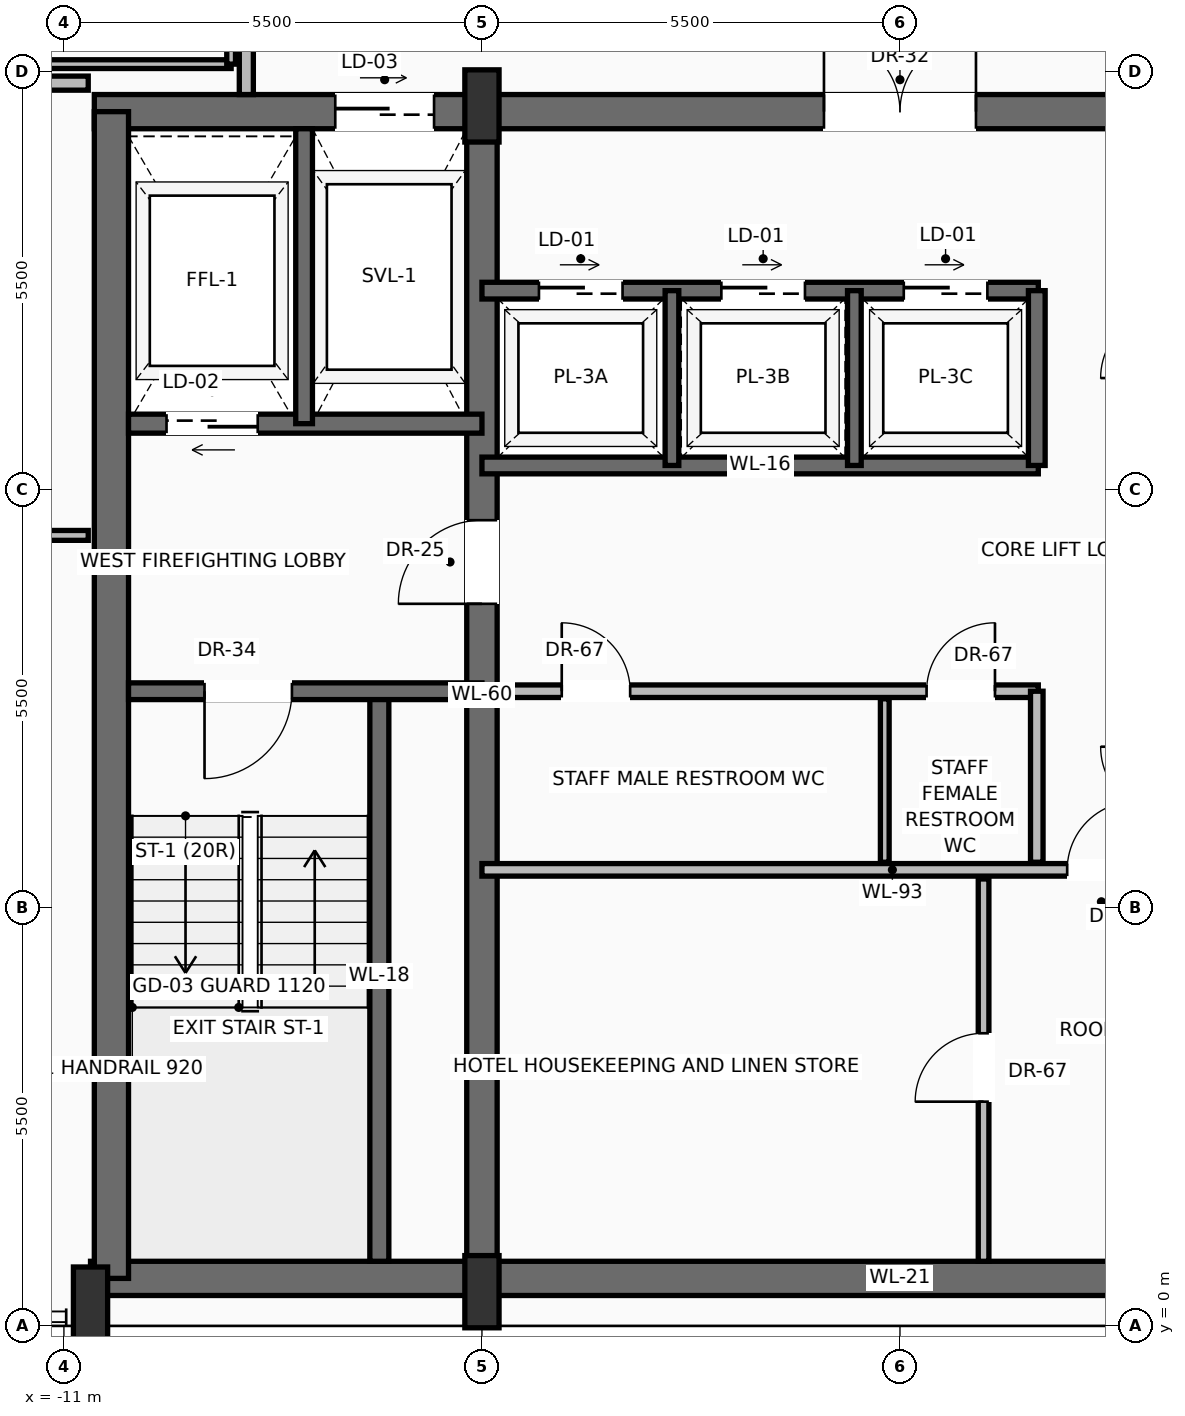
"""IFC4 building model, lengths in metres.
Left out: names, types, materials, properties, quantities, classifications, styles, units other than length and angle.
Written with IfcOpenShell. Run it as: python <this file> out.ifc"""

import sys

from ifc_helpers import new_model, si_unit, direction, frame, frame_2d, origin, origin_2d, place, context, subcontext, project, spatial, rectangle, extrude, source, transform, mapped, element, fill, save


model = new_model("IFC4")
c1 = context("Model", 3, precision=1e-05, world=origin(), true_north=direction((0.0, 1.0)))
c2 = subcontext(c1, "Body", "Model", "MODEL_VIEW")
j1 = project(units=[si_unit("LENGTHUNIT", "METRE"), si_unit("PLANEANGLEUNIT", "RADIAN")], contexts=[c1])
p1 = place(None, origin())
s1 = spatial("IfcSite", under=j1, at=p1, CompositionType="ELEMENT")
p2 = place(p1, origin())
s2 = spatial("IfcBuilding", under=s1, at=p2, CompositionType="ELEMENT")
p3 = place(p2, frame((0.0, 0.0, 266.1)))
s3 = spatial("IfcBuildingStorey", under=s2, at=p3, CompositionType="ELEMENT", Elevation=266.1)
p4 = place(p3, frame((-10.65, 0.625, 0.0), z_axis=(0.0, 0.0, 1.0), x_axis=(1.0, 0.0, 0.0)))
e1 = element("IfcWall", 1, at=p4, inside=s3, PredefinedType="SHEAR", context=c2, shape_type="SweptSolid", body=[
    extrude(rectangle(XDim=21.3, YDim=0.45, at=frame_2d((10.65, 0.0))), origin(), (0.0, 0.0, 1.0), 3.24),
])
p5 = place(p3, frame((-10.6, 15.975, 0.0), z_axis=(0.0, 0.0, 1.0), x_axis=(1.0, 0.0, 0.0)))
e2 = element("IfcWall", 2, at=p5, inside=s3, PredefinedType="SHEAR", context=c2, shape_type="SweptSolid", body=[
    extrude(rectangle(XDim=21.2, YDim=0.45, at=frame_2d((10.6, 0.0))), origin(), (0.0, 0.0, 1.0), 3.24),
])
p6 = place(p5, frame((3.17, 0.0, 0.0)))
e3 = element("IfcOpeningElement", 3, at=p6, cuts=e2, PredefinedType="OPENING", context=c2, shape_type="SweptSolid", body=[
    extrude(rectangle(XDim=1.3, YDim=2.3, at=frame_2d((0.65, 1.15))), frame((0.0, 0.235, 0.0), z_axis=(0.0, -1.0, 0.0), x_axis=(1.0, 0.0, 0.0)), (0.0, 0.0, 1.0), 0.47),
])
p7 = place(p5, frame((9.6, 0.0, 0.0)))
e4 = element("IfcOpeningElement", 4, at=p7, cuts=e2, PredefinedType="OPENING", context=c2, shape_type="SweptSolid", body=[
    extrude(rectangle(XDim=2.0, YDim=2.4, at=frame_2d((1.0, 1.2))), frame((0.0, 0.235, 0.0), z_axis=(0.0, -1.0, 0.0), x_axis=(1.0, 0.0, 0.0)), (0.0, 0.0, 1.0), 0.47),
])
p8 = place(p3, frame((-10.375, 0.625, 0.0), z_axis=(0.0, 0.0, 1.0), x_axis=(0.0, 1.0, 0.0)))
e5 = element("IfcWall", 5, at=p8, inside=s3, PredefinedType="SHEAR", context=c2, shape_type="SweptSolid", body=[
    extrude(rectangle(XDim=15.35, YDim=0.45, at=frame_2d((7.675, 0.0))), origin(), (0.0, 0.0, 1.0), 3.24),
])
p9 = place(p3, frame((-5.5, 0.625, 0.0), z_axis=(0.0, 0.0, 1.0), x_axis=(0.0, 1.0, 0.0)))
e6 = element("IfcWall", 6, at=p9, inside=s3, PredefinedType="SHEAR", context=c2, shape_type="SweptSolid", body=[
    extrude(rectangle(XDim=15.35, YDim=0.4, at=frame_2d((7.675, 0.0))), origin(), (0.0, 0.0, 1.0), 3.24),
])
p10 = place(p9, frame((8.875, 0.0, 0.0)))
e7 = element("IfcOpeningElement", 7, at=p10, cuts=e6, PredefinedType="OPENING", context=c2, shape_type="SweptSolid", body=[
    extrude(rectangle(XDim=1.1, YDim=2.2, at=frame_2d((0.55, 1.1))), frame((0.0, 0.21, 0.0), z_axis=(0.0, -1.0, 0.0), x_axis=(1.0, 0.0, 0.0)), (0.0, 0.0, 1.0), 0.42),
])
m1 = source(origin(), c2, "Body", "SweptSolid", [
    extrude(rectangle(XDim=0.45, YDim=0.95, at=origin_2d()), origin(), (0.0, 0.0, 1.0), 3.45),
])
for number, where, z_axis, x_axis in (
    (8, (-10.65, 0.3, 0.0), (0.0, 0.0, 1.0), (1.0, 0.0, 0.0)),
    (9, (-5.5, 0.45, 0.0), (0.0, 0.0, 1.0), (1.0, 0.0, 0.0)),
    (10, (-5.5, 16.05, 0.0), (0.0, 0.0, 1.0), (1.0, 0.0, 0.0)),
):
    element("IfcColumn", number, at=place(p3, frame(where, z_axis=z_axis, x_axis=x_axis)), inside=s3, PredefinedType="PILASTER", context=c2, shape_type="MappedRepresentation", body=[
        mapped(m1, transform((0.0, 0.0, 0.0), scale=1.0)),
    ])
p11 = place(p3, frame((-18.713, 14.466, 0.0), z_axis=(0.0, 0.0, 1.0), x_axis=(0.501837095331, 0.864962155097, 0.0)))
e11 = element("IfcWall", 11, at=p11, inside=s3, PredefinedType="SOLIDWALL", context=c2, shape_type="SweptSolid", body=[
    extrude(rectangle(XDim=19.956, YDim=0.28, at=frame_2d((9.978, 0.0))), origin(), (0.0, 0.0, 1.0), 2.82),
])
p12 = place(p11, frame((4.789, 0.0, 0.0)))
e12 = element("IfcOpeningElement", 12, at=p12, cuts=e11, PredefinedType="OPENING", context=c2, shape_type="SweptSolid", body=[
    extrude(rectangle(XDim=1.6, YDim=2.35, at=frame_2d((0.8, 1.175))), frame((0.0, 0.15, 0.0), z_axis=(0.0, -1.0, 0.0), x_axis=(1.0, 0.0, 0.0)), (0.0, 0.0, 1.0), 0.3),
])
p13 = place(p11, frame((13.57, 0.0, 0.9)))
e13 = element("IfcOpeningElement", 13, at=p13, cuts=e11, PredefinedType="OPENING", context=c2, shape_type="SweptSolid", body=[
    extrude(rectangle(XDim=1.55, YDim=1.75, at=frame_2d((0.775, 0.875))), frame((0.0, 0.15, 0.0), z_axis=(0.0, -1.0, 0.0), x_axis=(1.0, 0.0, 0.0)), (0.0, 0.0, 1.0), 0.3),
])
p14 = place(p3, frame((-6.85, 0.85, 0.0), z_axis=(0.0, 0.0, 1.0), x_axis=(0.0, 1.0, 0.0)))
e14 = element("IfcWall", 14, at=p14, inside=s3, PredefinedType="SOLIDWALL", context=c2, shape_type="SweptSolid", body=[
    extrude(rectangle(XDim=7.5, YDim=0.25, at=frame_2d((3.75, 0.0))), origin(), (0.0, 0.0, 1.0), 3.24),
])
p15 = place(p3, frame((-5.5, 8.35, 0.0), z_axis=(0.0, 0.0, 1.0), x_axis=(-1.0, 0.0, 0.0)))
e15 = element("IfcWall", 15, at=p15, inside=s3, PredefinedType="SOLIDWALL", context=c2, shape_type="SweptSolid", body=[
    extrude(rectangle(XDim=4.65, YDim=0.22, at=frame_2d((2.325, 0.0))), origin(), (0.0, 0.0, 1.0), 3.24),
])
p16 = place(p15, frame((2.5, 0.0, 0.0)))
e16 = element("IfcOpeningElement", 16, at=p16, cuts=e15, PredefinedType="OPENING", context=c2, shape_type="SweptSolid", body=[
    extrude(rectangle(XDim=1.15, YDim=2.2, at=frame_2d((0.575, 1.1))), frame((0.0, 0.12, 0.0), z_axis=(0.0, -1.0, 0.0), x_axis=(1.0, 0.0, 0.0)), (0.0, 0.0, 1.0), 0.24),
])
p17 = place(p3, frame((-5.5, 11.87, 0.0), z_axis=(0.0, 0.0, 1.0), x_axis=(-1.0, 0.0, 0.0)))
e17 = element("IfcWall", 17, at=p17, inside=s3, PredefinedType="SOLIDWALL", context=c2, shape_type="SweptSolid", body=[
    extrude(rectangle(XDim=4.65, YDim=0.25, at=frame_2d((2.325, 0.0))), origin(), (0.0, 0.0, 1.0), 3.24),
])
p18 = place(p17, frame((2.95, 0.0, 0.0)))
e18 = element("IfcOpeningElement", 18, at=p18, cuts=e17, PredefinedType="OPENING", context=c2, shape_type="SweptSolid", body=[
    extrude(rectangle(XDim=1.2, YDim=2.25, at=frame_2d((0.6, 1.125))), frame((0.0, 0.135, 0.0), z_axis=(0.0, -1.0, 0.0), x_axis=(1.0, 0.0, 0.0)), (0.0, 0.0, 1.0), 0.27),
])
p19 = place(p3, frame((-7.84, 11.87, 0.0), z_axis=(0.0, 0.0, 1.0), x_axis=(0.0, 1.0, 0.0)))
e19 = element("IfcWall", 19, at=p19, inside=s3, PredefinedType="SOLIDWALL", context=c2, shape_type="SweptSolid", body=[
    extrude(rectangle(XDim=3.88, YDim=0.22, at=frame_2d((1.94, 0.0))), origin(), (0.0, 0.0, 1.0), 3.24),
])
p20 = place(p3, frame((-5.5, 6.0, 0.0), z_axis=(0.0, 0.0, 1.0), x_axis=(1.0, 0.0, 0.0)))
e20 = element("IfcWall", 20, at=p20, inside=s3, PredefinedType="PARTITIONING", context=c2, shape_type="SweptSolid", body=[
    extrude(rectangle(XDim=10.8, YDim=0.165, at=frame_2d((5.4, 0.0))), origin(), (0.0, 0.0, 1.0), 3.232),
])
p21 = place(p20, frame((7.7, 0.0, 0.0)))
e21 = element("IfcOpeningElement", 21, at=p21, cuts=e20, PredefinedType="OPENING", context=c2, shape_type="SweptSolid", body=[
    extrude(rectangle(XDim=0.9, YDim=2.1, at=frame_2d((0.45, 1.05))), frame((0.0, 0.093, 0.0), z_axis=(0.0, -1.0, 0.0), x_axis=(1.0, 0.0, 0.0)), (0.0, 0.0, 1.0), 0.185),
])
p22 = place(p3, frame((1.1, 0.85, 0.0), z_axis=(0.0, 0.0, 1.0), x_axis=(0.0, 1.0, 0.0)))
e22 = element("IfcWall", 22, at=p22, inside=s3, PredefinedType="PARTITIONING", context=c2, shape_type="SweptSolid", body=[
    extrude(rectangle(XDim=5.03, YDim=0.14, at=frame_2d((2.515, 0.0))), origin(), (0.0, 0.0, 1.0), 3.232),
])
p23 = place(p22, frame((2.1, 0.0, 0.0)))
e23 = element("IfcOpeningElement", 23, at=p23, cuts=e22, PredefinedType="OPENING", context=c2, shape_type="SweptSolid", body=[
    extrude(rectangle(XDim=0.9, YDim=2.1, at=frame_2d((0.45, 1.05))), frame((0.0, 0.08, 0.0), z_axis=(0.0, -1.0, 0.0), x_axis=(1.0, 0.0, 0.0)), (0.0, 0.0, 1.0), 0.16),
])
p24 = place(p3, frame((-5.3, 8.35, 0.0), z_axis=(0.0, 0.0, 1.0), x_axis=(1.0, 0.0, 0.0)))
e24 = element("IfcWall", 24, at=p24, inside=s3, PredefinedType="PARTITIONING", context=c2, shape_type="SweptSolid", body=[
    extrude(rectangle(XDim=7.12, YDim=0.165, at=frame_2d((3.56, 0.0))), origin(), (0.0, 0.0, 1.0), 3.232),
])
p25 = place(p24, frame((0.85, 0.0, 0.0)))
e25 = element("IfcOpeningElement", 25, at=p25, cuts=e24, PredefinedType="OPENING", context=c2, shape_type="SweptSolid", body=[
    extrude(rectangle(XDim=0.9, YDim=2.1, at=frame_2d((0.45, 1.05))), frame((0.0, 0.093, 0.0), z_axis=(0.0, -1.0, 0.0), x_axis=(1.0, 0.0, 0.0)), (0.0, 0.0, 1.0), 0.185),
])
p26 = place(p24, frame((5.65, 0.0, 0.0)))
e26 = element("IfcOpeningElement", 26, at=p26, cuts=e24, PredefinedType="OPENING", context=c2, shape_type="SweptSolid", body=[
    extrude(rectangle(XDim=0.9, YDim=2.1, at=frame_2d((0.45, 1.05))), frame((0.0, 0.093, 0.0), z_axis=(0.0, -1.0, 0.0), x_axis=(1.0, 0.0, 0.0)), (0.0, 0.0, 1.0), 0.185),
])
p27 = place(p3, frame((1.8, 6.1, 0.0), z_axis=(0.0, 0.0, 1.0), x_axis=(0.0, 1.0, 0.0)))
e27 = element("IfcWall", 27, at=p27, inside=s3, PredefinedType="PARTITIONING", context=c2, shape_type="SweptSolid", body=[
    extrude(rectangle(XDim=2.25, YDim=0.165, at=frame_2d((1.125, 0.0))), origin(), (0.0, 0.0, 1.0), 3.232),
])
p28 = place(p3, frame((-0.2, 6.1, 0.0), z_axis=(0.0, 0.0, 1.0), x_axis=(0.0, 1.0, 0.0)))
e28 = element("IfcWall", 28, at=p28, inside=s3, PredefinedType="PARTITIONING", context=c2, shape_type="SweptSolid", body=[
    extrude(rectangle(XDim=2.15, YDim=0.115, at=frame_2d((1.075, 0.0))), origin(), (0.0, 0.0, 1.0), 3.232),
])
p29 = place(p3, frame((-5.5, 11.32, 0.0), z_axis=(0.0, 0.0, 1.0), x_axis=(1.0, 0.0, 0.0)))
e29 = element("IfcWall", 29, at=p29, inside=s3, PredefinedType="SOLIDWALL", context=c2, shape_type="SweptSolid", body=[
    extrude(rectangle(XDim=7.32, YDim=0.22, at=frame_2d((3.66, 0.0))), origin(), (0.0, 0.0, 1.0), 3.24),
])
p30 = place(p3, frame((-5.5, 13.62, 0.0), z_axis=(0.0, 0.0, 1.0), x_axis=(1.0, 0.0, 0.0)))
e30 = element("IfcWall", 30, at=p30, inside=s3, PredefinedType="SOLIDWALL", context=c2, shape_type="SweptSolid", body=[
    extrude(rectangle(XDim=7.32, YDim=0.22, at=frame_2d((3.66, 0.0))), origin(), (0.0, 0.0, 1.0), 3.24),
])
p31 = place(p30, frame((0.75, 0.0, 0.0)))
e31 = element("IfcOpeningElement", 31, at=p31, cuts=e30, PredefinedType="OPENING", context=c2, shape_type="SweptSolid", body=[
    extrude(rectangle(XDim=1.1, YDim=2.2, at=frame_2d((0.55, 1.1))), frame((0.0, 0.12, 0.0), z_axis=(0.0, -1.0, 0.0), x_axis=(1.0, 0.0, 0.0)), (0.0, 0.0, 1.0), 0.24),
])
p32 = place(p30, frame((3.15, 0.0, 0.0)))
e32 = element("IfcOpeningElement", 32, at=p32, cuts=e30, PredefinedType="OPENING", context=c2, shape_type="SweptSolid", body=[
    extrude(rectangle(XDim=1.1, YDim=2.2, at=frame_2d((0.55, 1.1))), frame((0.0, 0.12, 0.0), z_axis=(0.0, -1.0, 0.0), x_axis=(1.0, 0.0, 0.0)), (0.0, 0.0, 1.0), 0.24),
])
p33 = place(p30, frame((5.55, 0.0, 0.0)))
e33 = element("IfcOpeningElement", 33, at=p33, cuts=e30, PredefinedType="OPENING", context=c2, shape_type="SweptSolid", body=[
    extrude(rectangle(XDim=1.1, YDim=2.2, at=frame_2d((0.55, 1.1))), frame((0.0, 0.12, 0.0), z_axis=(0.0, -1.0, 0.0), x_axis=(1.0, 0.0, 0.0)), (0.0, 0.0, 1.0), 0.24),
])
p34 = place(p3, frame((1.8, 11.32, 0.0), z_axis=(0.0, 0.0, 1.0), x_axis=(0.0, 1.0, 0.0)))
e34 = element("IfcWall", 34, at=p34, inside=s3, PredefinedType="SOLIDWALL", context=c2, shape_type="SweptSolid", body=[
    extrude(rectangle(XDim=2.3, YDim=0.22, at=frame_2d((1.15, 0.0))), origin(), (0.0, 0.0, 1.0), 3.24),
])
for number, where, z_axis, x_axis in (
    (35, (-3.0, 11.32, 0.0), (0.0, 0.0, 1.0), (0.0, 1.0, 0.0)),
    (36, (-0.6, 11.32, 0.0), (0.0, 0.0, 1.0), (0.0, 1.0, 0.0)),
):
    element("IfcWall", number, at=place(p3, frame(where, z_axis=z_axis, x_axis=x_axis)), inside=s3, PredefinedType="SOLIDWALL", context=c2, shape_type="SweptSolid", body=[
        extrude(rectangle(XDim=2.3, YDim=0.18, at=frame_2d((1.15, 0.0))), origin(), (0.0, 0.0, 1.0), 3.24),
    ])
p35 = place(p3, frame((-8.6, 16.2, 0.0), z_axis=(0.0, 0.0, 1.0), x_axis=(0.0, 1.0, 0.0)))
e37 = element("IfcWall", 37, at=p35, inside=s3, PredefinedType="PARTITIONING", context=c2, shape_type="SweptSolid", body=[
    extrude(rectangle(XDim=13.8, YDim=0.185, at=frame_2d((6.9, 0.0))), origin(), (0.0, 0.0, 1.0), 3.232),
])
p36 = place(p35, frame((3.0, 0.0, 0.0)))
e38 = element("IfcOpeningElement", 38, at=p36, cuts=e37, PredefinedType="OPENING", context=c2, shape_type="SweptSolid", body=[
    extrude(rectangle(XDim=1.05, YDim=2.25, at=frame_2d((0.525, 1.125))), frame((0.0, 0.103, 0.0), z_axis=(0.0, -1.0, 0.0), x_axis=(1.0, 0.0, 0.0)), (0.0, 0.0, 1.0), 0.205),
])
p37 = place(p35, frame((7.088, 0.0, 0.0)))
e39 = element("IfcOpeningElement", 39, at=p37, cuts=e37, PredefinedType="OPENING", context=c2, shape_type="SweptSolid", body=[
    extrude(rectangle(XDim=1.05, YDim=2.25, at=frame_2d((0.525, 1.125))), frame((0.0, 0.103, 0.0), z_axis=(0.0, -1.0, 0.0), x_axis=(1.0, 0.0, 0.0)), (0.0, 0.0, 1.0), 0.205),
])
p38 = place(p3, frame((-17.77, 16.35, 0.0), z_axis=(0.0, 0.0, 1.0), x_axis=(1.0, 0.0, 0.0)))
e40 = element("IfcWall", 40, at=p38, inside=s3, PredefinedType="PARTITIONING", context=c2, shape_type="SweptSolid", body=[
    extrude(rectangle(XDim=7.09, YDim=0.185, at=frame_2d((3.545, 0.0))), origin(), (0.0, 0.0, 1.0), 3.232),
])
p39 = place(p38, frame((3.982, 0.0, 0.0)))
e41 = element("IfcOpeningElement", 41, at=p39, cuts=e40, PredefinedType="OPENING", context=c2, shape_type="SweptSolid", body=[
    extrude(rectangle(XDim=1.05, YDim=2.25, at=frame_2d((0.525, 1.125))), frame((0.0, 0.103, 0.0), z_axis=(0.0, -1.0, 0.0), x_axis=(1.0, 0.0, 0.0)), (0.0, 0.0, 1.0), 0.205),
])
p40 = place(p3, frame((-21.222, 10.4, 0.0), z_axis=(0.0, 0.0, 1.0), x_axis=(1.0, 0.0, 0.0)))
e42 = element("IfcWall", 42, at=p40, inside=s3, PredefinedType="PARTITIONING", context=c2, shape_type="SweptSolid", body=[
    extrude(rectangle(XDim=10.542, YDim=0.13, at=frame_2d((5.271, 0.0))), origin(), (0.0, 0.0, 1.0), 3.232),
])
p41 = place(p40, frame((4.303, 0.0, 0.0)))
e43 = element("IfcOpeningElement", 43, at=p41, cuts=e42, PredefinedType="OPENING", context=c2, shape_type="SweptSolid", body=[
    extrude(rectangle(XDim=0.95, YDim=2.2, at=frame_2d((0.475, 1.1))), frame((0.0, 0.075, 0.0), z_axis=(0.0, -1.0, 0.0), x_axis=(1.0, 0.0, 0.0)), (0.0, 0.0, 1.0), 0.15),
])
p42 = place(p3, frame((-11.45, 16.6, 0.0), z_axis=(0.0, 0.0, 1.0), x_axis=(1.0, 0.0, 0.0)))
e44 = element("IfcWall", 44, at=p42, inside=s3, PredefinedType="PARTITIONING", context=c2, shape_type="SweptSolid", body=[
    extrude(rectangle(XDim=2.65, YDim=0.115, at=frame_2d((1.325, 0.0))), origin(), (0.0, 0.0, 1.0), 3.232),
])
p43 = place(p3, frame((-8.8, 16.6, 0.0), z_axis=(0.0, 0.0, 1.0), x_axis=(0.0, 1.0, 0.0)))
e45 = element("IfcWall", 45, at=p43, inside=s3, PredefinedType="PARTITIONING", context=c2, shape_type="SweptSolid", body=[
    extrude(rectangle(XDim=2.4, YDim=0.115, at=frame_2d((1.2, 0.0))), origin(), (0.0, 0.0, 1.0), 3.232),
])
m2 = source(origin(), c2, "Body", "SweptSolid", [
    extrude(rectangle(XDim=1.15, YDim=2.2, at=frame_2d((0.575, 1.1))), frame((0.0, 0.025, 0.0), z_axis=(0.0, -1.0, 0.0), x_axis=(1.0, 0.0, 0.0)), (0.0, 0.0, 1.0), 0.05),
])
p44 = place(p16, origin())
e46 = element("IfcDoor", 46, at=p44, inside=s3, OperationType="SINGLE_SWING_RIGHT", PredefinedType="DOOR", context=c2, shape_type="MappedRepresentation", body=[
    mapped(m2, transform((0.0, 0.0, 0.0), scale=1.0)),
])
fill(e16, e46)
m3 = source(origin(), c2, "Body", "SweptSolid", [
    extrude(rectangle(XDim=1.1, YDim=2.2, at=frame_2d((0.55, 1.1))), frame((0.0, 0.025, 0.0), z_axis=(0.0, -1.0, 0.0), x_axis=(1.0, 0.0, 0.0)), (0.0, 0.0, 1.0), 0.05),
])
p45 = place(p10, origin())
e47 = element("IfcDoor", 47, at=p45, inside=s3, OperationType="SINGLE_SWING_LEFT", PredefinedType="DOOR", context=c2, shape_type="MappedRepresentation", body=[
    mapped(m3, transform((0.0, 0.0, 0.0), scale=1.0)),
])
fill(e7, e47)
m4 = source(origin(), c2, "Body", "SweptSolid", [
    extrude(rectangle(XDim=1.2, YDim=2.25, at=frame_2d((0.6, 1.125))), frame((0.0, 0.025, 0.0), z_axis=(0.0, -1.0, 0.0), x_axis=(1.0, 0.0, 0.0)), (0.0, 0.0, 1.0), 0.05),
])
p46 = place(p18, origin())
e48 = element("IfcDoor", 48, at=p46, inside=s3, OperationType="SLIDING_TO_LEFT", PredefinedType="DOOR", context=c2, shape_type="MappedRepresentation", body=[
    mapped(m4, transform((0.0, 0.0, 0.0), scale=1.0)),
])
fill(e18, e48)
m5 = source(origin(), c2, "Body", "SweptSolid", [
    extrude(rectangle(XDim=1.3, YDim=2.3, at=frame_2d((0.65, 1.15))), frame((0.0, 0.025, 0.0), z_axis=(0.0, -1.0, 0.0), x_axis=(1.0, 0.0, 0.0)), (0.0, 0.0, 1.0), 0.05),
])
p47 = place(p6, origin())
e49 = element("IfcDoor", 49, at=p47, inside=s3, OperationType="SLIDING_TO_RIGHT", PredefinedType="DOOR", context=c2, shape_type="MappedRepresentation", body=[
    mapped(m5, transform((0.0, 0.0, 0.0), scale=1.0)),
])
fill(e3, e49)
m6 = source(origin(), c2, "Body", "SweptSolid", [
    extrude(rectangle(XDim=2.0, YDim=2.4, at=frame_2d((1.0, 1.2))), frame((0.0, 0.025, 0.0), z_axis=(0.0, -1.0, 0.0), x_axis=(1.0, 0.0, 0.0)), (0.0, 0.0, 1.0), 0.05),
])
p48 = place(p7, origin())
e50 = element("IfcDoor", 50, at=p48, inside=s3, OperationType="DOUBLE_DOOR_SINGLE_SWING", PredefinedType="DOOR", context=c2, shape_type="MappedRepresentation", body=[
    mapped(m6, transform((0.0, 0.0, 0.0), scale=1.0)),
])
fill(e4, e50)
m7 = source(origin(), c2, "Body", "SweptSolid", [
    extrude(rectangle(XDim=0.9, YDim=2.1, at=frame_2d((0.45, 1.05))), frame((0.0, 0.025, 0.0), z_axis=(0.0, -1.0, 0.0), x_axis=(1.0, 0.0, 0.0)), (0.0, 0.0, 1.0), 0.05),
])
p49 = place(p21, origin())
e51 = element("IfcDoor", 51, at=p49, inside=s3, OperationType="SINGLE_SWING_RIGHT", PredefinedType="DOOR", context=c2, shape_type="MappedRepresentation", body=[
    mapped(m7, transform((0.0, 0.0, 0.0), scale=1.0)),
])
fill(e21, e51)
p50 = place(p23, origin())
e52 = element("IfcDoor", 52, at=p50, inside=s3, OperationType="SINGLE_SWING_LEFT", PredefinedType="DOOR", context=c2, shape_type="MappedRepresentation", body=[
    mapped(m7, transform((0.0, 0.0, 0.0), scale=1.0)),
])
fill(e23, e52)
p51 = place(p25, origin())
e53 = element("IfcDoor", 53, at=p51, inside=s3, OperationType="SINGLE_SWING_LEFT", PredefinedType="DOOR", context=c2, shape_type="MappedRepresentation", body=[
    mapped(m7, transform((0.0, 0.0, 0.0), scale=1.0)),
])
fill(e25, e53)
p52 = place(p26, origin())
e54 = element("IfcDoor", 54, at=p52, inside=s3, OperationType="SINGLE_SWING_RIGHT", PredefinedType="DOOR", context=c2, shape_type="MappedRepresentation", body=[
    mapped(m7, transform((0.0, 0.0, 0.0), scale=1.0)),
])
fill(e26, e54)
m8 = source(origin(), c2, "Body", "SweptSolid", [
    extrude(rectangle(XDim=1.1, YDim=2.2, at=frame_2d((0.55, 1.1))), frame((0.0, 0.025, 0.0), z_axis=(0.0, -1.0, 0.0), x_axis=(1.0, 0.0, 0.0)), (0.0, 0.0, 1.0), 0.05),
])
p53 = place(p31, origin())
e55 = element("IfcDoor", 55, at=p53, inside=s3, OperationType="SLIDING_TO_RIGHT", PredefinedType="DOOR", context=c2, shape_type="MappedRepresentation", body=[
    mapped(m8, transform((0.0, 0.0, 0.0), scale=1.0)),
])
fill(e31, e55)
p54 = place(p32, origin())
e56 = element("IfcDoor", 56, at=p54, inside=s3, OperationType="SLIDING_TO_RIGHT", PredefinedType="DOOR", context=c2, shape_type="MappedRepresentation", body=[
    mapped(m8, transform((0.0, 0.0, 0.0), scale=1.0)),
])
fill(e32, e56)
p55 = place(p33, origin())
e57 = element("IfcDoor", 57, at=p55, inside=s3, OperationType="SLIDING_TO_RIGHT", PredefinedType="DOOR", context=c2, shape_type="MappedRepresentation", body=[
    mapped(m8, transform((0.0, 0.0, 0.0), scale=1.0)),
])
fill(e33, e57)
save(model, sys.argv[1])
